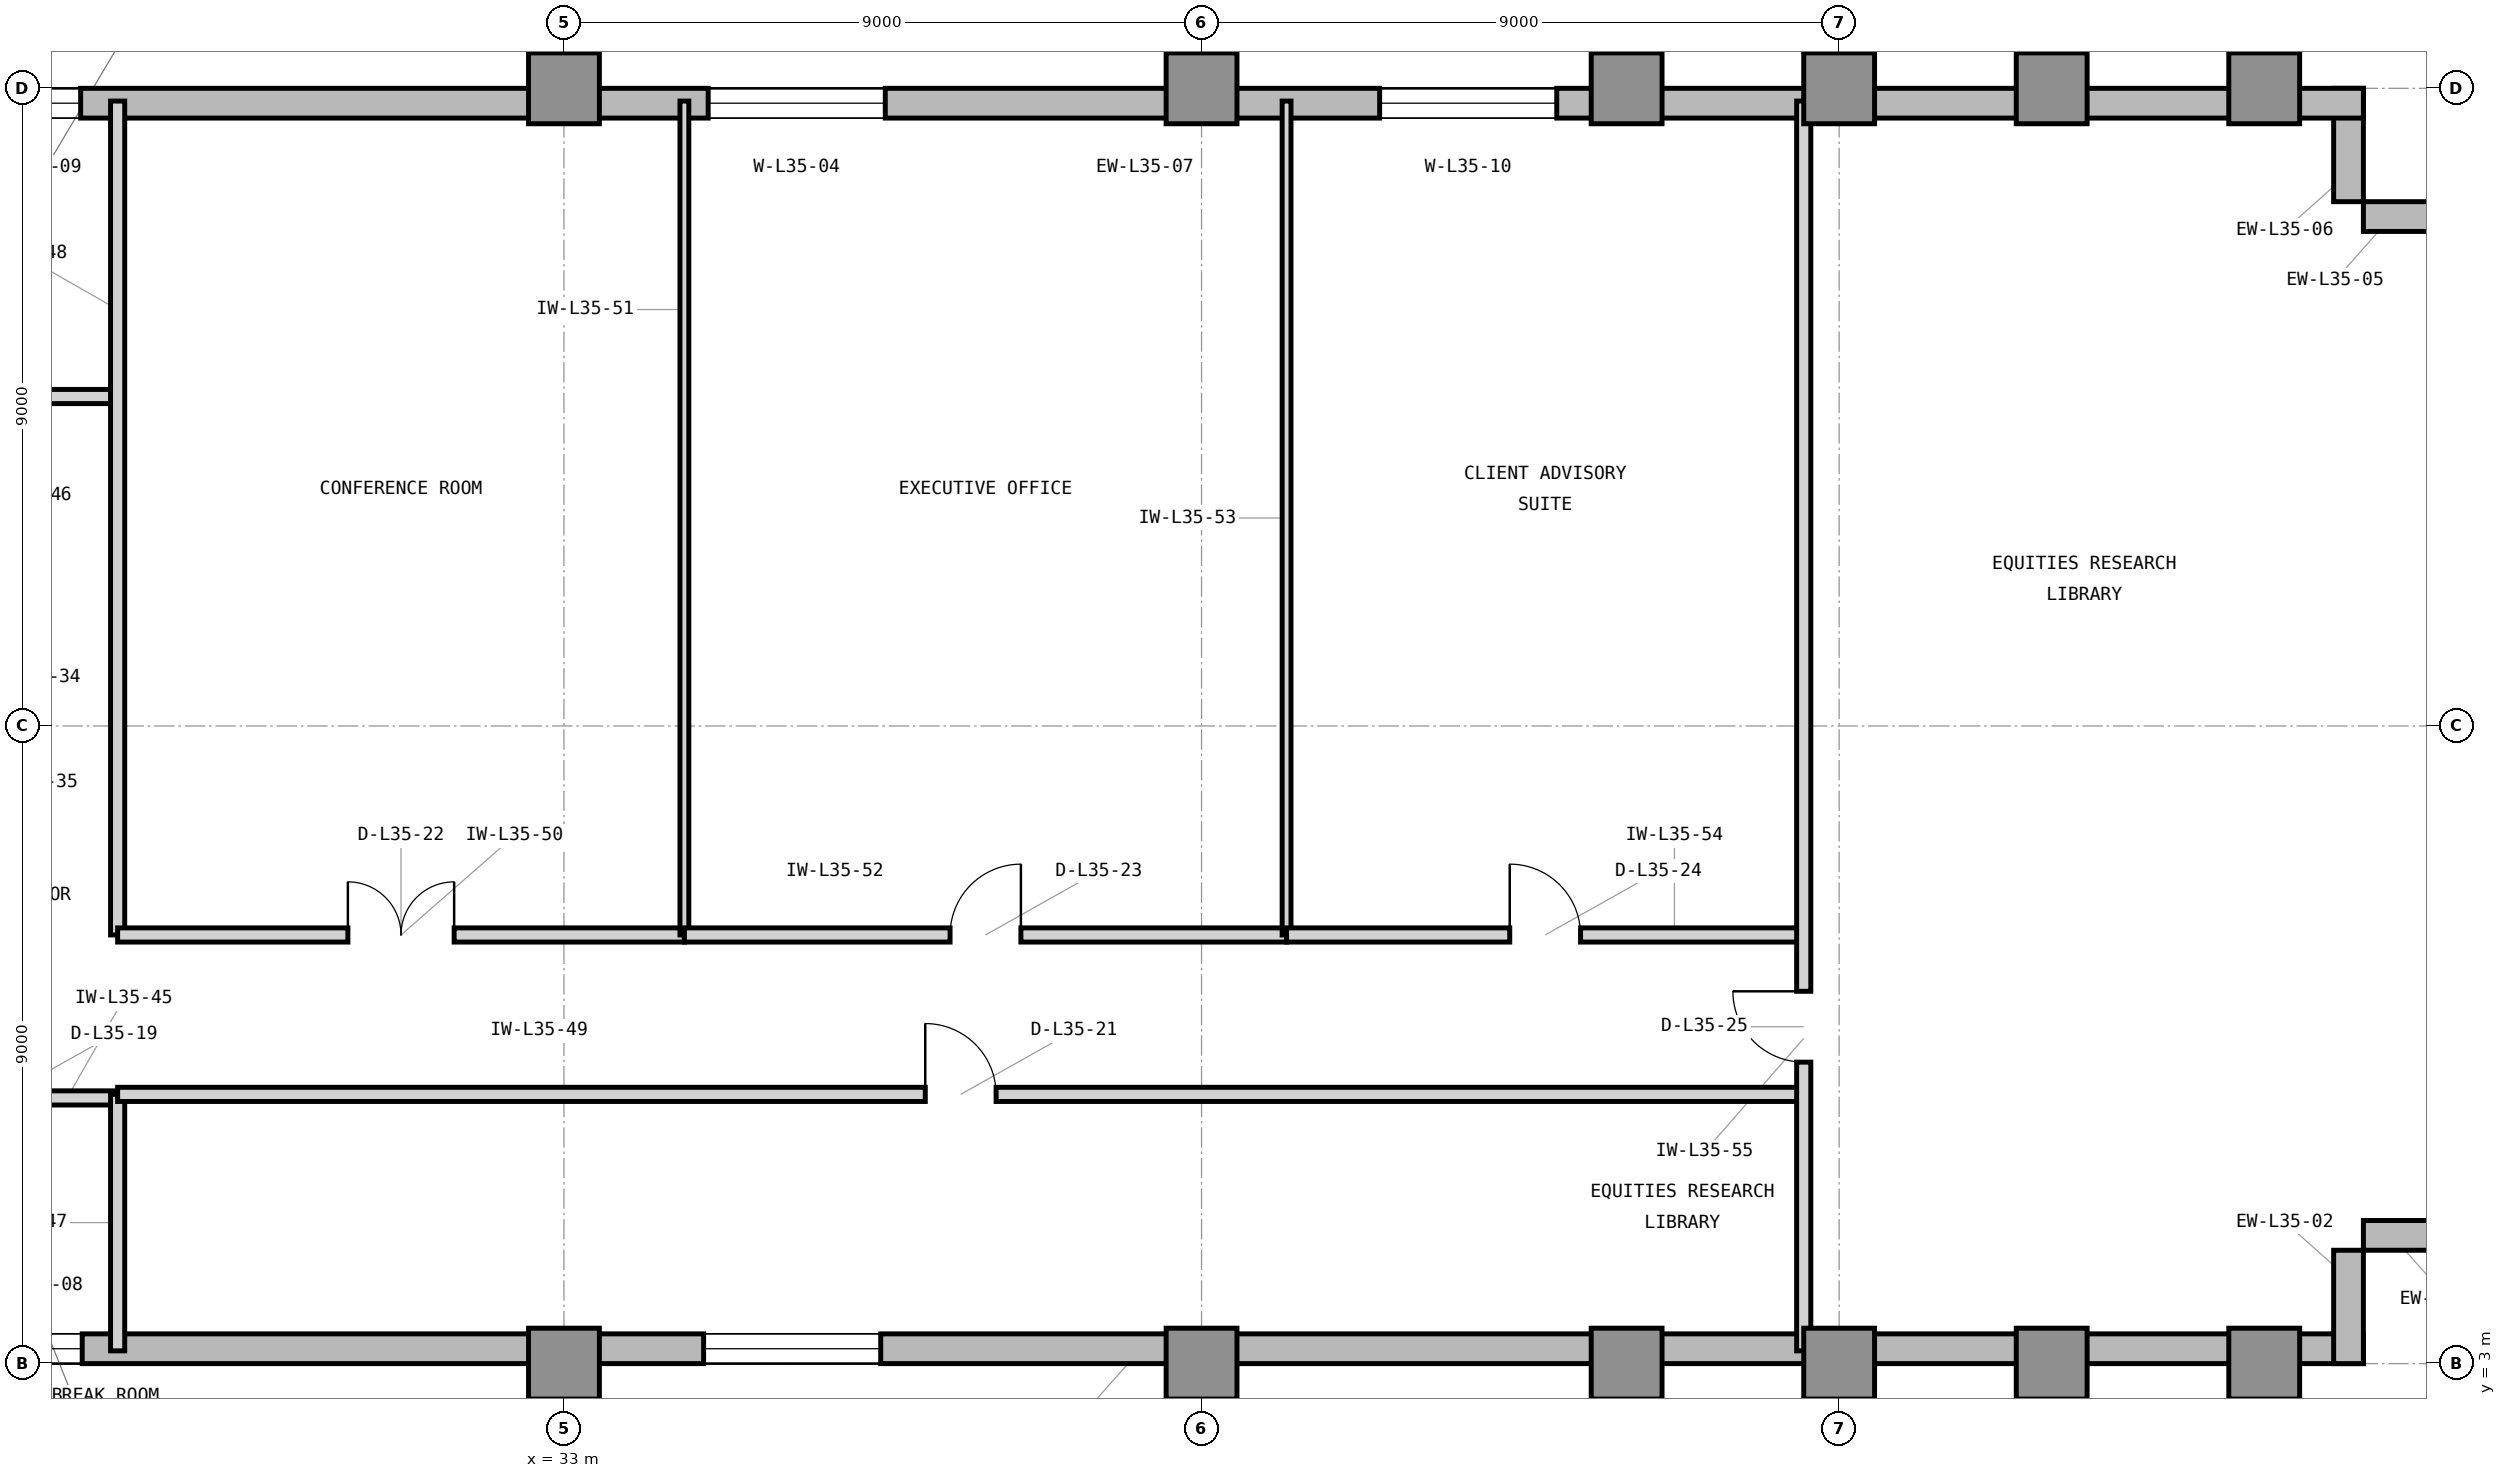
"""IFC4 building model, lengths in metres.
Left out: names, types, materials, properties, quantities, classifications, styles, units other than length and angle.
Written with IfcOpenShell. Run it as: python <this file> out.ifc"""

import sys

from ifc_helpers import new_model, si_unit, direction, frame, frame_2d, origin, origin_2d, place, context, subcontext, project, spatial, rectangle, extrude, element, fill, save


model = new_model("IFC4")
c1 = context("Model", 3, precision=1e-05, world=origin(), true_north=direction((0.0, 1.0)))
c2 = subcontext(c1, "Body", "Model", "MODEL_VIEW")
j1 = project(units=[si_unit("LENGTHUNIT", "METRE"), si_unit("PLANEANGLEUNIT", "RADIAN")], contexts=[c1])
p1 = place(None, origin())
s1 = spatial("IfcSite", under=j1, at=p1, CompositionType="ELEMENT")
p2 = place(p1, origin())
s2 = spatial("IfcBuilding", under=s1, at=p2, CompositionType="ELEMENT")
p3 = place(p2, frame((0.0, 0.0, 147.9)))
s3 = spatial("IfcBuildingStorey", under=s2, at=p3, CompositionType="ELEMENT", Elevation=147.9)
for number, where, z_axis, x_axis in (
    (1, (33.0, 3.0, 0.0), (0.0, 0.0, 1.0), (1.0, 0.0, 0.0)),
    (2, (33.0, 21.0, 0.0), (0.0, 0.0, 1.0), (1.0, 0.0, 0.0)),
    (3, (42.0, 3.0, 0.0), (0.0, 0.0, 1.0), (1.0, 0.0, 0.0)),
    (4, (42.0, 21.0, 0.0), (0.0, 0.0, 1.0), (1.0, 0.0, 0.0)),
    (5, (48.0, 3.0, 0.0), (0.0, 0.0, 1.0), (1.0, 0.0, 0.0)),
    (6, (48.0, 21.0, 0.0), (0.0, 0.0, 1.0), (1.0, 0.0, 0.0)),
    (7, (51.0, 3.0, 0.0), (0.0, 0.0, 1.0), (1.0, 0.0, 0.0)),
    (8, (51.0, 21.0, 0.0), (0.0, 0.0, 1.0), (1.0, 0.0, 0.0)),
    (9, (54.0, 3.0, 0.0), (0.0, 0.0, 1.0), (1.0, 0.0, 0.0)),
    (10, (54.0, 21.0, 0.0), (0.0, 0.0, 1.0), (1.0, 0.0, 0.0)),
    (11, (57.0, 3.0, 0.0), (0.0, 0.0, 1.0), (1.0, 0.0, 0.0)),
    (12, (57.0, 21.0, 0.0), (0.0, 0.0, 1.0), (1.0, 0.0, 0.0)),
):
    element("IfcColumn", number, at=place(p3, frame(where, z_axis=z_axis, x_axis=x_axis)), inside=s3, PredefinedType="COLUMN", context=c2, shape_type="SweptSolid", body=[
        extrude(rectangle(XDim=1.0, YDim=1.0, at=origin_2d()), origin(), (0.0, 0.0, 1.0), 3.9),
    ])
p4 = place(p3, frame((23.9, 3.21, 0.0), z_axis=(0.0, 0.0, 1.0), x_axis=(1.0, 0.0, 0.0)))
e13 = element("IfcWall", 13, at=p4, inside=s3, PredefinedType="STANDARD", context=c2, shape_type="SweptSolid", body=[
    extrude(rectangle(XDim=34.5, YDim=0.42, at=frame_2d((17.25, 0.0))), origin(), (0.0, 0.0, 1.0), 3.7),
])
p5 = place(p4, frame((11.071, 0.0, 0.85)))
e14 = element("IfcOpeningElement", 14, at=p5, cuts=e13, PredefinedType="OPENING", context=c2, shape_type="SweptSolid", body=[
    extrude(rectangle(XDim=2.5, YDim=2.25, at=frame_2d((1.25, 1.125))), frame((0.0, 0.22, 0.0), z_axis=(0.0, -1.0, 0.0), x_axis=(1.0, 0.0, 0.0)), (0.0, 0.0, 1.0), 0.44),
])
p6 = place(p4, frame((1.1, 0.0, 0.85)))
e15 = element("IfcOpeningElement", 15, at=p6, cuts=e13, PredefinedType="OPENING", context=c2, shape_type="SweptSolid", body=[
    extrude(rectangle(XDim=1.2, YDim=2.25, at=frame_2d((0.6, 1.125))), frame((0.0, 0.22, 0.0), z_axis=(0.0, -1.0, 0.0), x_axis=(1.0, 0.0, 0.0)), (0.0, 0.0, 1.0), 0.44),
])
for number, where, z_axis, x_axis in (
    (16, (58.19, 3.0, 0.0), (0.0, 0.0, 1.0), (0.0, 1.0, 0.0)),
    (17, (58.4, 4.81, 0.0), (0.0, 0.0, 1.0), (1.0, 0.0, 0.0)),
    (18, (60.0, 19.19, 0.0), (0.0, 0.0, 1.0), (-1.0, 0.0, 0.0)),
    (19, (58.19, 19.4, 0.0), (0.0, 0.0, 1.0), (0.0, 1.0, 0.0)),
):
    element("IfcWall", number, at=place(p3, frame(where, z_axis=z_axis, x_axis=x_axis)), inside=s3, PredefinedType="STANDARD", context=c2, shape_type="SweptSolid", body=[
        extrude(rectangle(XDim=1.6, YDim=0.42, at=frame_2d((0.8, 0.0))), origin(), (0.0, 0.0, 1.0), 3.7),
    ])
p7 = place(p3, frame((58.4, 20.79, 0.0), z_axis=(0.0, 0.0, 1.0), x_axis=(-1.0, 0.0, 0.0)))
e20 = element("IfcWall", 20, at=p7, inside=s3, PredefinedType="STANDARD", context=c2, shape_type="SweptSolid", body=[
    extrude(rectangle(XDim=34.4, YDim=0.42, at=frame_2d((17.2, 0.0))), origin(), (0.0, 0.0, 1.0), 3.7),
])
p8 = place(p7, frame((20.864, 0.0, 0.85)))
e21 = element("IfcOpeningElement", 21, at=p8, cuts=e20, PredefinedType="OPENING", context=c2, shape_type="SweptSolid", body=[
    extrude(rectangle(XDim=2.5, YDim=2.25, at=frame_2d((1.25, 1.125))), frame((0.0, 0.22, 0.0), z_axis=(0.0, -1.0, 0.0), x_axis=(1.0, 0.0, 0.0)), (0.0, 0.0, 1.0), 0.44),
])
p9 = place(p7, frame((32.222, 0.0, 0.85)))
e22 = element("IfcOpeningElement", 22, at=p9, cuts=e20, PredefinedType="OPENING", context=c2, shape_type="SweptSolid", body=[
    extrude(rectangle(XDim=1.2, YDim=2.25, at=frame_2d((0.6, 1.125))), frame((0.0, 0.22, 0.0), z_axis=(0.0, -1.0, 0.0), x_axis=(1.0, 0.0, 0.0)), (0.0, 0.0, 1.0), 0.44),
])
p10 = place(p7, frame((11.386, 0.0, 0.85)))
e23 = element("IfcOpeningElement", 23, at=p10, cuts=e20, PredefinedType="OPENING", context=c2, shape_type="SweptSolid", body=[
    extrude(rectangle(XDim=2.5, YDim=2.25, at=frame_2d((1.25, 1.125))), frame((0.0, 0.22, 0.0), z_axis=(0.0, -1.0, 0.0), x_axis=(1.0, 0.0, 0.0)), (0.0, 0.0, 1.0), 0.44),
])
p11 = place(p3, frame((23.85, 6.75, 0.0), z_axis=(0.0, 0.0, 1.0), x_axis=(1.0, 0.0, 0.0)))
e24 = element("IfcWall", 24, at=p11, inside=s3, PredefinedType="PARTITIONING", context=c2, shape_type="SweptSolid", body=[
    extrude(rectangle(XDim=2.85, YDim=0.2, at=frame_2d((1.425, 0.0))), origin(), (0.0, 0.0, 1.0), 3.69),
])
p12 = place(p11, frame((0.7, 0.0, 0.0)))
e25 = element("IfcOpeningElement", 25, at=p12, cuts=e24, PredefinedType="OPENING", context=c2, shape_type="SweptSolid", body=[
    extrude(rectangle(XDim=1.0, YDim=2.15, at=frame_2d((0.5, 1.075))), frame((0.0, 0.11, 0.0), z_axis=(0.0, -1.0, 0.0), x_axis=(1.0, 0.0, 0.0)), (0.0, 0.0, 1.0), 0.22),
])
p13 = place(p3, frame((23.85, 16.65, 0.0), z_axis=(0.0, 0.0, 1.0), x_axis=(1.0, 0.0, 0.0)))
e26 = element("IfcWall", 26, at=p13, inside=s3, PredefinedType="PARTITIONING", context=c2, shape_type="SweptSolid", body=[
    extrude(rectangle(XDim=2.85, YDim=0.2, at=frame_2d((1.425, 0.0))), origin(), (0.0, 0.0, 1.0), 3.69),
])
p14 = place(p13, frame((0.7, 0.0, 0.0)))
e27 = element("IfcOpeningElement", 27, at=p14, cuts=e26, PredefinedType="OPENING", context=c2, shape_type="SweptSolid", body=[
    extrude(rectangle(XDim=1.0, YDim=2.15, at=frame_2d((0.5, 1.075))), frame((0.0, 0.11, 0.0), z_axis=(0.0, -1.0, 0.0), x_axis=(1.0, 0.0, 0.0)), (0.0, 0.0, 1.0), 0.22),
])
p15 = place(p3, frame((26.7, 3.18, 0.0), z_axis=(0.0, 0.0, 1.0), x_axis=(0.0, 1.0, 0.0)))
e28 = element("IfcWall", 28, at=p15, inside=s3, PredefinedType="PARTITIONING", context=c2, shape_type="SweptSolid", body=[
    extrude(rectangle(XDim=3.62, YDim=0.2, at=frame_2d((1.81, 0.0))), origin(), (0.0, 0.0, 1.0), 3.69),
])
p16 = place(p3, frame((26.7, 9.05, 0.0), z_axis=(0.0, 0.0, 1.0), x_axis=(0.0, 1.0, 0.0)))
e29 = element("IfcWall", 29, at=p16, inside=s3, PredefinedType="PARTITIONING", context=c2, shape_type="SweptSolid", body=[
    extrude(rectangle(XDim=11.77, YDim=0.2, at=frame_2d((5.885, 0.0))), origin(), (0.0, 0.0, 1.0), 3.69),
])
p17 = place(p3, frame((26.7, 6.8, 0.0), z_axis=(0.0, 0.0, 1.0), x_axis=(1.0, 0.0, 0.0)))
e30 = element("IfcWall", 30, at=p17, inside=s3, PredefinedType="PARTITIONING", context=c2, shape_type="SweptSolid", body=[
    extrude(rectangle(XDim=23.8, YDim=0.2, at=frame_2d((11.9, 0.0))), origin(), (0.0, 0.0, 1.0), 3.69),
])
p18 = place(p17, frame((11.4, 0.0, 0.0)))
e31 = element("IfcOpeningElement", 31, at=p18, cuts=e30, PredefinedType="OPENING", context=c2, shape_type="SweptSolid", body=[
    extrude(rectangle(XDim=1.0, YDim=2.15, at=frame_2d((0.5, 1.075))), frame((0.0, 0.11, 0.0), z_axis=(0.0, -1.0, 0.0), x_axis=(1.0, 0.0, 0.0)), (0.0, 0.0, 1.0), 0.22),
])
p19 = place(p3, frame((26.7, 9.05, 0.0), z_axis=(0.0, 0.0, 1.0), x_axis=(1.0, 0.0, 0.0)))
e32 = element("IfcWall", 32, at=p19, inside=s3, PredefinedType="PARTITIONING", context=c2, shape_type="SweptSolid", body=[
    extrude(rectangle(XDim=8.0, YDim=0.2, at=frame_2d((4.0, 0.0))), origin(), (0.0, 0.0, 1.0), 3.233),
])
p20 = place(p19, frame((3.25, 0.0, 0.0)))
e33 = element("IfcOpeningElement", 33, at=p20, cuts=e32, PredefinedType="OPENING", context=c2, shape_type="SweptSolid", body=[
    extrude(rectangle(XDim=1.5, YDim=2.3, at=frame_2d((0.75, 1.15))), frame((0.0, 0.11, 0.0), z_axis=(0.0, -1.0, 0.0), x_axis=(1.0, 0.0, 0.0)), (0.0, 0.0, 1.0), 0.22),
])
p21 = place(p3, frame((34.7, 9.05, 0.0), z_axis=(0.0, 0.0, 1.0), x_axis=(0.0, 1.0, 0.0)))
e34 = element("IfcWall", 34, at=p21, inside=s3, PredefinedType="PARTITIONING", context=c2, shape_type="SweptSolid", body=[
    extrude(rectangle(XDim=11.77, YDim=0.125, at=frame_2d((5.885, 0.0))), origin(), (0.0, 0.0, 1.0), 3.69),
])
p22 = place(p3, frame((34.7, 9.05, 0.0), z_axis=(0.0, 0.0, 1.0), x_axis=(1.0, 0.0, 0.0)))
e35 = element("IfcWall", 35, at=p22, inside=s3, PredefinedType="PARTITIONING", context=c2, shape_type="SweptSolid", body=[
    extrude(rectangle(XDim=8.5, YDim=0.2, at=frame_2d((4.25, 0.0))), origin(), (0.0, 0.0, 1.0), 3.233),
])
p23 = place(p22, frame((3.75, 0.0, 0.0)))
e36 = element("IfcOpeningElement", 36, at=p23, cuts=e35, PredefinedType="OPENING", context=c2, shape_type="SweptSolid", body=[
    extrude(rectangle(XDim=1.0, YDim=2.15, at=frame_2d((0.5, 1.075))), frame((0.0, 0.11, 0.0), z_axis=(0.0, -1.0, 0.0), x_axis=(1.0, 0.0, 0.0)), (0.0, 0.0, 1.0), 0.22),
])
p24 = place(p3, frame((43.2, 9.05, 0.0), z_axis=(0.0, 0.0, 1.0), x_axis=(0.0, 1.0, 0.0)))
e37 = element("IfcWall", 37, at=p24, inside=s3, PredefinedType="PARTITIONING", context=c2, shape_type="SweptSolid", body=[
    extrude(rectangle(XDim=11.77, YDim=0.125, at=frame_2d((5.885, 0.0))), origin(), (0.0, 0.0, 1.0), 3.69),
])
p25 = place(p3, frame((43.2, 9.05, 0.0), z_axis=(0.0, 0.0, 1.0), x_axis=(1.0, 0.0, 0.0)))
e38 = element("IfcWall", 38, at=p25, inside=s3, PredefinedType="PARTITIONING", context=c2, shape_type="SweptSolid", body=[
    extrude(rectangle(XDim=7.3, YDim=0.2, at=frame_2d((3.65, 0.0))), origin(), (0.0, 0.0, 1.0), 3.233),
])
p26 = place(p25, frame((3.15, 0.0, 0.0)))
e39 = element("IfcOpeningElement", 39, at=p26, cuts=e38, PredefinedType="OPENING", context=c2, shape_type="SweptSolid", body=[
    extrude(rectangle(XDim=1.0, YDim=2.15, at=frame_2d((0.5, 1.075))), frame((0.0, 0.11, 0.0), z_axis=(0.0, -1.0, 0.0), x_axis=(1.0, 0.0, 0.0)), (0.0, 0.0, 1.0), 0.22),
])
p27 = place(p3, frame((50.5, 3.18, 0.0), z_axis=(0.0, 0.0, 1.0), x_axis=(0.0, 1.0, 0.0)))
e40 = element("IfcWall", 40, at=p27, inside=s3, PredefinedType="PARTITIONING", context=c2, shape_type="SweptSolid", body=[
    extrude(rectangle(XDim=17.64, YDim=0.2, at=frame_2d((8.82, 0.0))), origin(), (0.0, 0.0, 1.0), 3.69),
])
p28 = place(p27, frame((4.075, 0.0, 0.0)))
e41 = element("IfcOpeningElement", 41, at=p28, cuts=e40, PredefinedType="OPENING", context=c2, shape_type="SweptSolid", body=[
    extrude(rectangle(XDim=1.0, YDim=2.15, at=frame_2d((0.5, 1.075))), frame((0.0, 0.11, 0.0), z_axis=(0.0, -1.0, 0.0), x_axis=(1.0, 0.0, 0.0)), (0.0, 0.0, 1.0), 0.22),
])
p29 = place(p5, origin())
e42 = element("IfcWindow", 42, at=p29, inside=s3, PartitioningType="SINGLE_PANEL", PredefinedType="WINDOW", context=c2, shape_type="SweptSolid", body=[
    extrude(rectangle(XDim=2.5, YDim=2.25, at=frame_2d((1.25, 1.125))), frame((0.0, 0.11, 0.0), z_axis=(0.0, -1.0, 0.0), x_axis=(1.0, 0.0, 0.0)), (0.0, 0.0, 1.0), 0.06),
])
fill(e14, e42)
p30 = place(p8, origin())
e43 = element("IfcWindow", 43, at=p30, inside=s3, PartitioningType="SINGLE_PANEL", PredefinedType="WINDOW", context=c2, shape_type="SweptSolid", body=[
    extrude(rectangle(XDim=2.5, YDim=2.25, at=frame_2d((1.25, 1.125))), frame((0.0, 0.11, 0.0), z_axis=(0.0, -1.0, 0.0), x_axis=(1.0, 0.0, 0.0)), (0.0, 0.0, 1.0), 0.06),
])
fill(e21, e43)
p31 = place(p18, origin())
e44 = element("IfcDoor", 44, at=p31, inside=s3, OperationType="SINGLE_SWING_LEFT", PredefinedType="DOOR", context=c2, shape_type="SweptSolid", body=[
    extrude(rectangle(XDim=1.0, YDim=2.15, at=frame_2d((0.5, 1.075))), frame((0.0, 0.025, 0.0), z_axis=(0.0, -1.0, 0.0), x_axis=(1.0, 0.0, 0.0)), (0.0, 0.0, 1.0), 0.05),
])
fill(e31, e44)
p32 = place(p20, origin())
e45 = element("IfcDoor", 45, at=p32, inside=s3, OperationType="DOUBLE_DOOR_SINGLE_SWING", PredefinedType="DOOR", context=c2, shape_type="SweptSolid", body=[
    extrude(rectangle(XDim=1.5, YDim=2.3, at=frame_2d((0.75, 1.15))), frame((0.0, 0.025, 0.0), z_axis=(0.0, -1.0, 0.0), x_axis=(1.0, 0.0, 0.0)), (0.0, 0.0, 1.0), 0.05),
])
fill(e33, e45)
p33 = place(p23, origin())
e46 = element("IfcDoor", 46, at=p33, inside=s3, OperationType="SINGLE_SWING_RIGHT", PredefinedType="DOOR", context=c2, shape_type="SweptSolid", body=[
    extrude(rectangle(XDim=1.0, YDim=2.15, at=frame_2d((0.5, 1.075))), frame((0.0, 0.025, 0.0), z_axis=(0.0, -1.0, 0.0), x_axis=(1.0, 0.0, 0.0)), (0.0, 0.0, 1.0), 0.05),
])
fill(e36, e46)
p34 = place(p26, origin())
e47 = element("IfcDoor", 47, at=p34, inside=s3, OperationType="SINGLE_SWING_LEFT", PredefinedType="DOOR", context=c2, shape_type="SweptSolid", body=[
    extrude(rectangle(XDim=1.0, YDim=2.15, at=frame_2d((0.5, 1.075))), frame((0.0, 0.025, 0.0), z_axis=(0.0, -1.0, 0.0), x_axis=(1.0, 0.0, 0.0)), (0.0, 0.0, 1.0), 0.05),
])
fill(e39, e47)
p35 = place(p28, origin())
e48 = element("IfcDoor", 48, at=p35, inside=s3, OperationType="SINGLE_SWING_RIGHT", PredefinedType="DOOR", context=c2, shape_type="SweptSolid", body=[
    extrude(rectangle(XDim=1.0, YDim=2.15, at=frame_2d((0.5, 1.075))), frame((0.0, 0.025, 0.0), z_axis=(0.0, -1.0, 0.0), x_axis=(1.0, 0.0, 0.0)), (0.0, 0.0, 1.0), 0.05),
])
fill(e41, e48)
p36 = place(p6, origin())
e49 = element("IfcWindow", 49, at=p36, inside=s3, PartitioningType="SINGLE_PANEL", PredefinedType="WINDOW", context=c2, shape_type="SweptSolid", body=[
    extrude(rectangle(XDim=1.2, YDim=2.25, at=frame_2d((0.6, 1.125))), frame((0.0, 0.11, 0.0), z_axis=(0.0, -1.0, 0.0), x_axis=(1.0, 0.0, 0.0)), (0.0, 0.0, 1.0), 0.06),
])
fill(e15, e49)
p37 = place(p9, origin())
e50 = element("IfcWindow", 50, at=p37, inside=s3, PartitioningType="SINGLE_PANEL", PredefinedType="WINDOW", context=c2, shape_type="SweptSolid", body=[
    extrude(rectangle(XDim=1.2, YDim=2.25, at=frame_2d((0.6, 1.125))), frame((0.0, 0.11, 0.0), z_axis=(0.0, -1.0, 0.0), x_axis=(1.0, 0.0, 0.0)), (0.0, 0.0, 1.0), 0.06),
])
fill(e22, e50)
p38 = place(p10, origin())
e51 = element("IfcWindow", 51, at=p38, inside=s3, PartitioningType="SINGLE_PANEL", PredefinedType="WINDOW", context=c2, shape_type="SweptSolid", body=[
    extrude(rectangle(XDim=2.5, YDim=2.25, at=frame_2d((1.25, 1.125))), frame((0.0, 0.11, 0.0), z_axis=(0.0, -1.0, 0.0), x_axis=(1.0, 0.0, 0.0)), (0.0, 0.0, 1.0), 0.06),
])
fill(e23, e51)
save(model, sys.argv[1])
